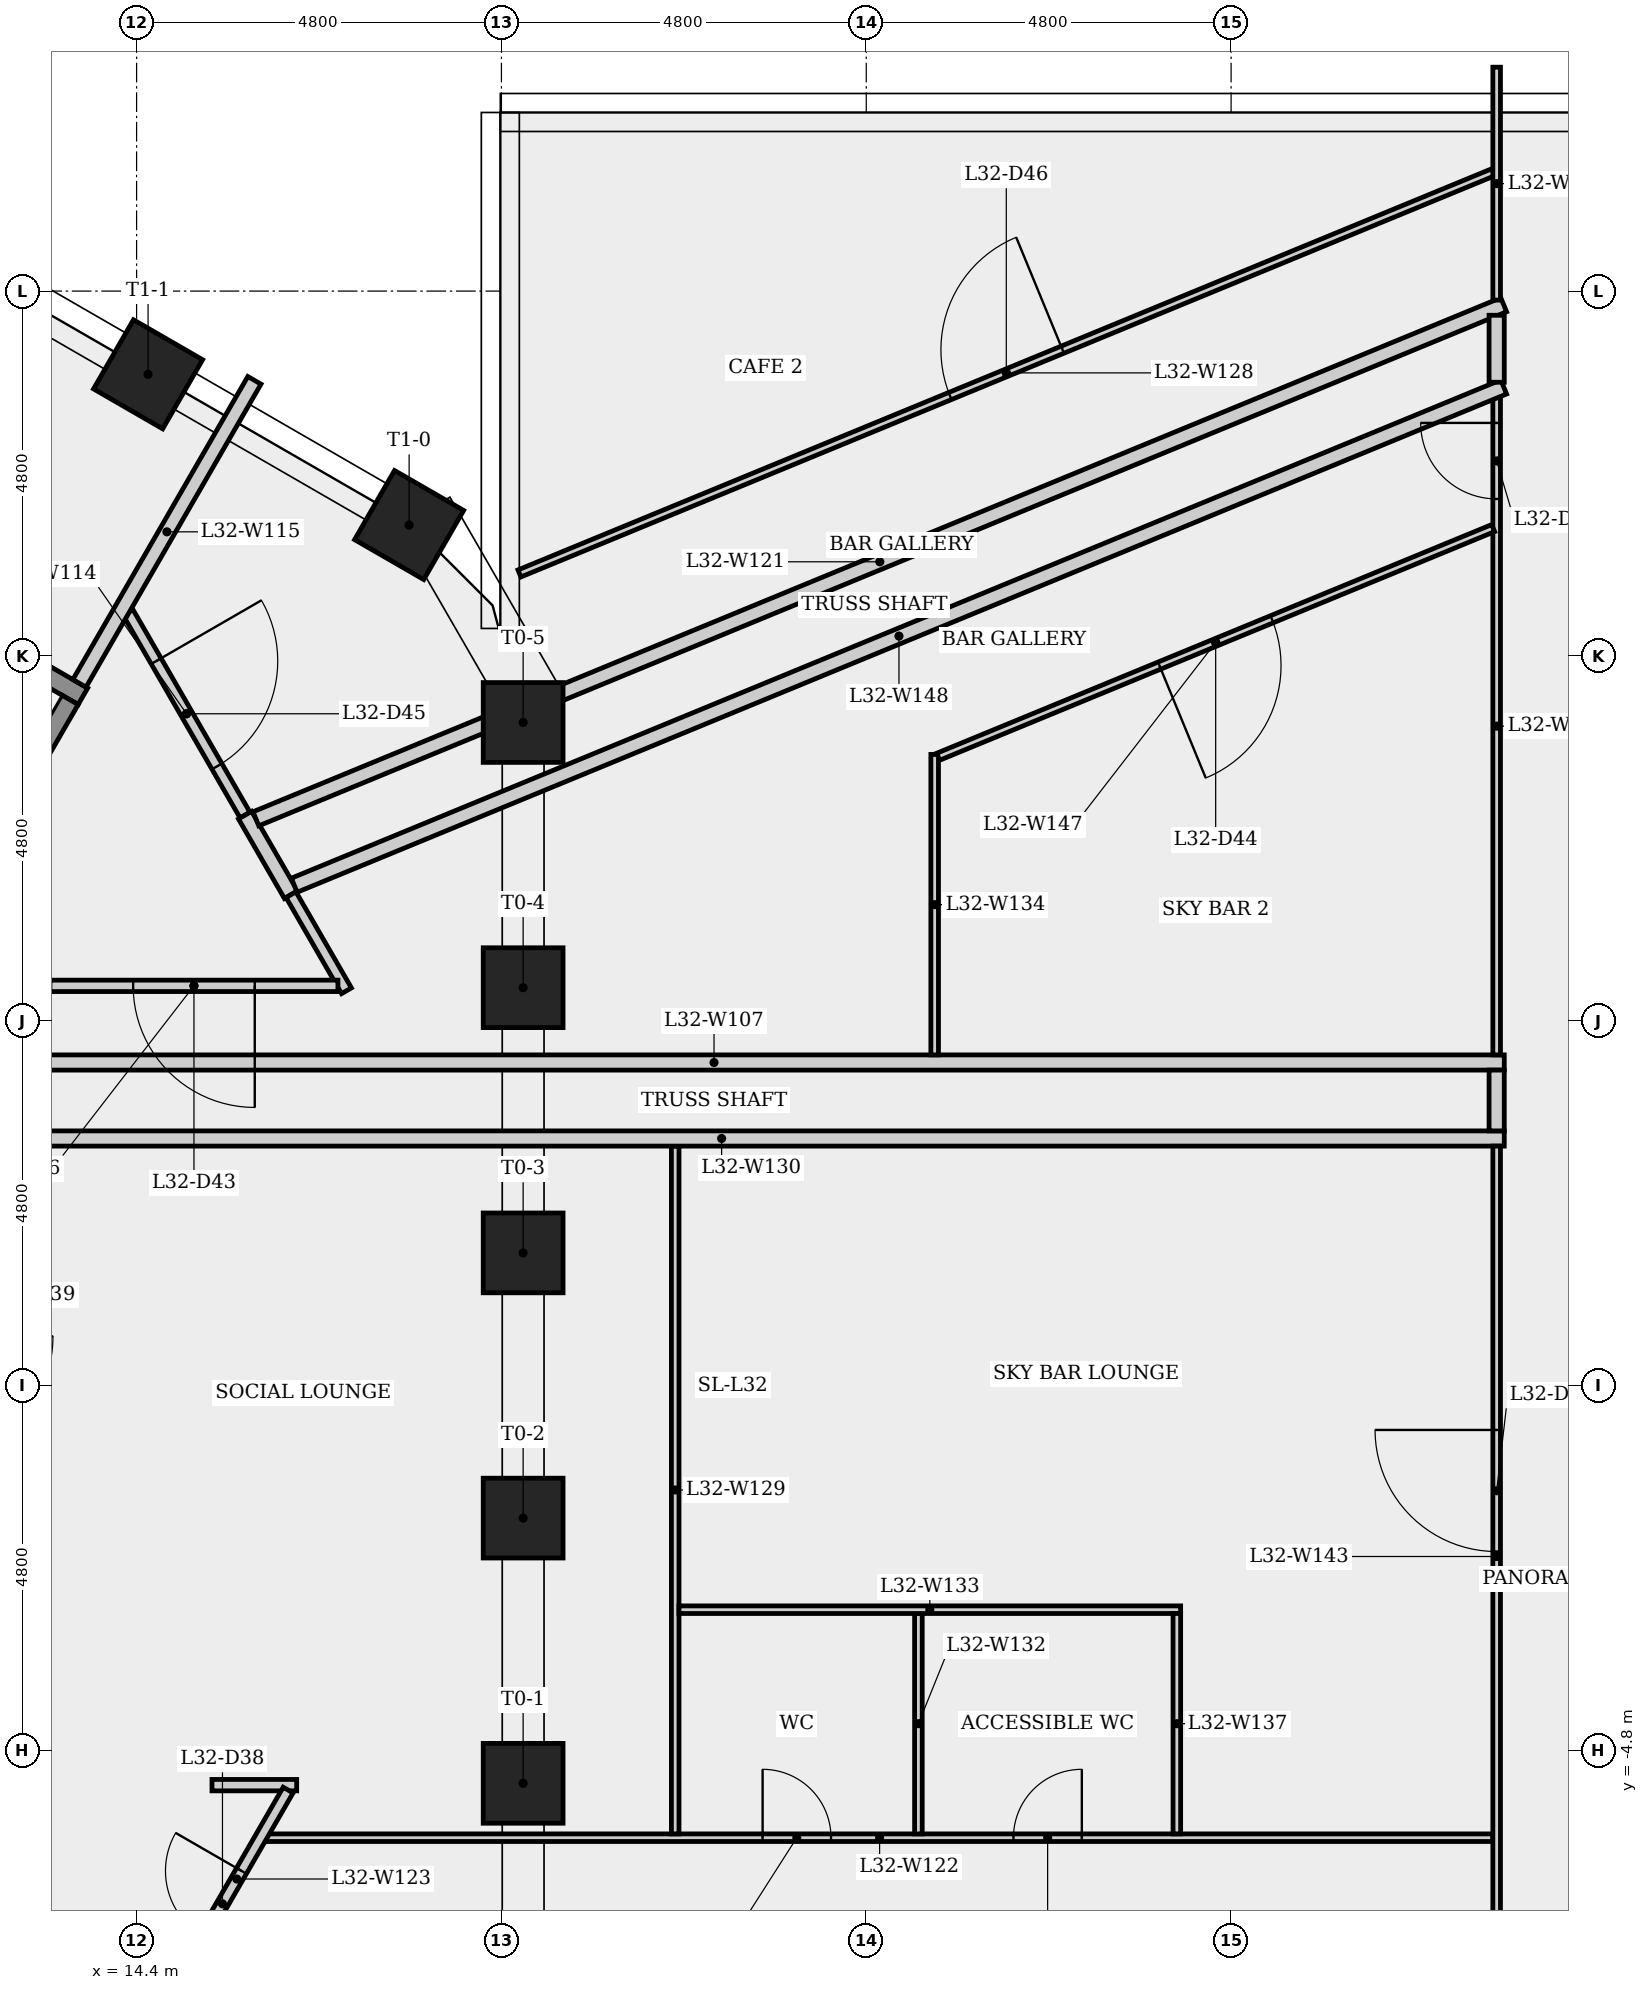
"""IFC4 building model, lengths in metres.
Left out: names, types, materials, properties, quantities, classifications, styles, units other than length and angle.
Written with IfcOpenShell. Run it as: python <this file> out.ifc"""

import sys

from ifc_helpers import new_model, si_unit, direction, frame, frame_2d, origin, origin_2d, place, context, subcontext, project, spatial, rectangle, extrude, element, fill, save


model = new_model("IFC4")
c1 = context("Model", 3, precision=1e-05, world=origin(), true_north=direction((0.0, 1.0)))
c2 = subcontext(c1, "Body", "Model", "MODEL_VIEW")
j1 = project(units=[si_unit("LENGTHUNIT", "METRE"), si_unit("PLANEANGLEUNIT", "RADIAN")], contexts=[c1])
p1 = place(None, origin())
s1 = spatial("IfcSite", under=j1, at=p1, CompositionType="ELEMENT")
p2 = place(p1, origin())
s2 = spatial("IfcBuilding", under=s1, at=p2, CompositionType="ELEMENT")
p3 = place(p2, frame((0.0, 0.0, 120.5)))
s3 = spatial("IfcBuildingStorey", under=s2, at=p3, CompositionType="ELEMENT", Elevation=120.5)
for number, where, z_axis, x_axis in (
    (1, (19.486, -5.234, 0.0), (0.0, 0.0, 1.0), (1.0, 0.0, 0.0)),
    (2, (19.486, -1.745, 0.0), (0.0, 0.0, 1.0), (1.0, 0.0, 0.0)),
    (3, (19.486, 1.745, 0.0), (0.0, 0.0, 1.0), (1.0, 0.0, 0.0)),
    (4, (19.486, 5.234, 0.0), (0.0, 0.0, 1.0), (1.0, 0.0, 0.0)),
    (5, (19.486, 8.724, 0.0), (0.0, 0.0, 1.0), (1.0, 0.0, 0.0)),
    (6, (17.986, 11.322, 0.0), (0.0, 0.0, 1.0), (0.5, 0.866, 0.0)),
    (7, (14.551, 13.305, 0.0), (0.0, 0.0, 1.0), (0.5, 0.866, 0.0)),
):
    element("IfcColumn", number, at=place(p3, frame(where, z_axis=z_axis, x_axis=x_axis)), inside=s3, PredefinedType="COLUMN", context=c2, shape_type="SweptSolid", body=[
        extrude(rectangle(XDim=1.05, YDim=1.05, at=origin_2d()), origin(), (0.0, 0.0, 1.0), 4.0),
    ])
p4 = place(p3, frame((8.151, 12.268, 0.0), z_axis=(0.0, 0.0, 1.0), x_axis=(0.866025499775, -0.499999833739, 0.0)))
e8 = element("IfcWall", 8, at=p4, inside=s3, PredefinedType="SHEAR", context=c2, shape_type="SweptSolid", body=[
    extrude(rectangle(XDim=6.4, YDim=0.25, at=frame_2d((3.2, 0.0))), origin(), (0.0, 0.0, 1.0), 3.6),
])
p5 = place(p3, frame((11.6, 4.25, 0.0), z_axis=(0.0, 0.0, 1.0), x_axis=(1.0, 0.0, 0.0)))
e9 = element("IfcWall", 9, at=p5, inside=s3, PredefinedType="PLUMBINGWALL", context=c2, shape_type="SweptSolid", body=[
    extrude(rectangle(XDim=20.794, YDim=0.2, at=frame_2d((10.397, 0.0))), origin(), (0.0, 0.0, 1.0), 3.6),
])
p6 = place(p3, frame((13.523, 9.022, 0.0), z_axis=(0.0, 0.0, 1.0), x_axis=(-0.500013277472, -0.866017737897, 0.0)))
e10 = element("IfcWall", 10, at=p6, inside=s3, PredefinedType="SHEAR", context=c2, shape_type="SweptSolid", body=[
    extrude(rectangle(XDim=2.786, YDim=0.25, at=frame_2d((1.393, 0.0))), origin(), (0.0, 0.0, 1.0), 3.6),
])
p7 = place(p3, frame((14.287, 10.172, 0.0), z_axis=(0.0, 0.0, 1.0), x_axis=(0.500017452277, -0.866015327473, 0.0)))
e11 = element("IfcWall", 11, at=p7, inside=s3, PredefinedType="PARTITIONING", context=c2, shape_type="SweptSolid", body=[
    extrude(rectangle(XDim=3.081, YDim=0.15, at=frame_2d((1.54, 0.0))), origin(), (0.0, 0.0, 1.0), 3.6),
])
p8 = place(p7, frame((0.74, 0.0, 0.0)))
e12 = element("IfcOpeningElement", 12, at=p8, cuts=e11, PredefinedType="OPENING", context=c2, shape_type="SweptSolid", body=[
    extrude(rectangle(XDim=1.6, YDim=2.1, at=frame_2d((0.8, 1.05))), frame((0.0, 0.085, 0.0), z_axis=(0.0, -1.0, 0.0), x_axis=(1.0, 0.0, 0.0)), (0.0, 0.0, 1.0), 0.17),
])
p9 = place(p3, frame((13.648, 9.239, 0.0), z_axis=(0.0, 0.0, 1.0), x_axis=(0.499971870506, 0.866041643746, 0.0)))
e13 = element("IfcWall", 13, at=p9, inside=s3, PredefinedType="PLUMBINGWALL", context=c2, shape_type="SweptSolid", body=[
    extrude(rectangle(XDim=4.604, YDim=0.2, at=frame_2d((2.302, 0.0))), origin(), (0.0, 0.0, 1.0), 3.6),
])
p10 = place(p3, frame((15.392, -5.259, 0.0), z_axis=(0.0, 0.0, 1.0), x_axis=(1.0, 0.0, 0.0)))
e14 = element("IfcWall", 14, at=p10, inside=s3, PredefinedType="PARTITIONING", context=c2, shape_type="SweptSolid", body=[
    extrude(rectangle(XDim=1.114, YDim=0.15, at=frame_2d((0.557, 0.0))), origin(), (0.0, 0.0, 1.0), 3.6),
])
p11 = place(p3, frame((15.827, 7.505, 0.0), z_axis=(0.0, 0.0, 1.0), x_axis=(0.500112762726, -0.865960290405, 0.0)))
e15 = element("IfcWall", 15, at=p11, inside=s3, PredefinedType="PLUMBINGWALL", context=c2, shape_type="SweptSolid", body=[
    extrude(rectangle(XDim=1.209, YDim=0.2, at=frame_2d((0.604, 0.0))), origin(), (0.0, 0.0, 1.0), 3.6),
])
p12 = place(p3, frame((15.969, 7.456, 0.0), z_axis=(0.0, 0.0, 1.0), x_axis=(0.924606037794, 0.380924762749, 0.0)))
e16 = element("IfcWall", 16, at=p12, inside=s3, PredefinedType="PLUMBINGWALL", context=c2, shape_type="SweptSolid", body=[
    extrude(rectangle(XDim=17.756, YDim=0.2, at=frame_2d((8.878, 0.0))), origin(), (0.0, 0.0, 1.0), 3.6),
])
p13 = place(p3, frame((16.107, -5.95, 0.0), z_axis=(0.0, 0.0, 1.0), x_axis=(1.0, 0.0, 0.0)))
e17 = element("IfcWall", 17, at=p13, inside=s3, PredefinedType="PARTITIONING", context=c2, shape_type="SweptSolid", body=[
    extrude(rectangle(XDim=16.137, YDim=0.1, at=frame_2d((8.069, 0.0))), origin(), (0.0, 0.0, 1.0), 3.6),
])
p14 = place(p13, frame((6.529, 0.0, 0.0)))
e18 = element("IfcOpeningElement", 18, at=p14, cuts=e17, PredefinedType="OPENING", context=c2, shape_type="SweptSolid", body=[
    extrude(rectangle(XDim=0.9, YDim=2.1, at=frame_2d((0.45, 1.05))), frame((0.0, 0.06, 0.0), z_axis=(0.0, -1.0, 0.0), x_axis=(1.0, 0.0, 0.0)), (0.0, 0.0, 1.0), 0.12),
])
p15 = place(p13, frame((9.829, 0.0, 0.0)))
e19 = element("IfcOpeningElement", 19, at=p15, cuts=e17, PredefinedType="OPENING", context=c2, shape_type="SweptSolid", body=[
    extrude(rectangle(XDim=0.9, YDim=2.1, at=frame_2d((0.45, 1.05))), frame((0.0, 0.06, 0.0), z_axis=(0.0, -1.0, 0.0), x_axis=(1.0, 0.0, 0.0)), (0.0, 0.0, 1.0), 0.12),
])
p16 = place(p3, frame((15.042, -7.664, 0.0), z_axis=(0.0, 0.0, 1.0), x_axis=(0.500006618465, 0.866021582578, 0.0)))
e20 = element("IfcWall", 20, at=p16, inside=s3, PredefinedType="PARTITIONING", context=c2, shape_type="SweptSolid", body=[
    extrude(rectangle(XDim=2.702, YDim=0.15, at=frame_2d((1.351, 0.0))), origin(), (0.0, 0.0, 1.0), 3.6),
])
p17 = place(p16, frame((0.474, 0.0, 0.0)))
e21 = element("IfcOpeningElement", 21, at=p17, cuts=e20, PredefinedType="OPENING", context=c2, shape_type="SweptSolid", body=[
    extrude(rectangle(XDim=1.0, YDim=2.1, at=frame_2d((0.5, 1.05))), frame((0.0, 0.085, 0.0), z_axis=(0.0, -1.0, 0.0), x_axis=(1.0, 0.0, 0.0)), (0.0, 0.0, 1.0), 0.17),
])
p18 = place(p3, frame((16.431, 6.458, 0.0), z_axis=(0.0, 0.0, 1.0), x_axis=(0.49998782916, -0.866032430508, 0.0)))
e22 = element("IfcWall", 22, at=p18, inside=s3, PredefinedType="PARTITIONING", context=c2, shape_type="SweptSolid", body=[
    extrude(rectangle(XDim=1.46, YDim=0.15, at=frame_2d((0.73, 0.0))), origin(), (0.0, 0.0, 1.0), 3.6),
])
p19 = place(p3, frame((17.049, 5.259, 0.0), z_axis=(0.0, 0.0, 1.0), x_axis=(-1.0, 0.0, 0.0)))
e23 = element("IfcWall", 23, at=p19, inside=s3, PredefinedType="PARTITIONING", context=c2, shape_type="SweptSolid", body=[
    extrude(rectangle(XDim=3.789, YDim=0.15, at=frame_2d((1.895, 0.0))), origin(), (0.0, 0.0, 1.0), 3.6),
])
p20 = place(p19, frame((1.094, 0.0, 0.0)))
e24 = element("IfcOpeningElement", 24, at=p20, cuts=e23, PredefinedType="OPENING", context=c2, shape_type="SweptSolid", body=[
    extrude(rectangle(XDim=1.6, YDim=2.1, at=frame_2d((0.8, 1.05))), frame((0.0, 0.085, 0.0), z_axis=(0.0, -1.0, 0.0), x_axis=(1.0, 0.0, 0.0)), (0.0, 0.0, 1.0), 0.17),
])
p21 = place(p3, frame((19.437, 10.685, 0.0), z_axis=(0.0, 0.0, 1.0), x_axis=(0.924603272901, 0.380931473813, 0.0)))
e25 = element("IfcWall", 25, at=p21, inside=s3, PredefinedType="PARTITIONING", context=c2, shape_type="SweptSolid", body=[
    extrude(rectangle(XDim=13.856, YDim=0.1, at=frame_2d((6.928, 0.0))), origin(), (0.0, 0.0, 1.0), 3.6),
])
p22 = place(p21, frame((6.128, 0.0, 0.0)))
e26 = element("IfcOpeningElement", 26, at=p22, cuts=e25, PredefinedType="OPENING", context=c2, shape_type="SweptSolid", body=[
    extrude(rectangle(XDim=1.6, YDim=2.1, at=frame_2d((0.8, 1.05))), frame((0.0, 0.06, 0.0), z_axis=(0.0, -1.0, 0.0), x_axis=(1.0, 0.0, 0.0)), (0.0, 0.0, 1.0), 0.12),
])
p23 = place(p3, frame((21.486, -5.9, 0.0), z_axis=(0.0, 0.0, 1.0), x_axis=(0.0, 1.0, 0.0)))
e27 = element("IfcWall", 27, at=p23, inside=s3, PredefinedType="PARTITIONING", context=c2, shape_type="SweptSolid", body=[
    extrude(rectangle(XDim=9.05, YDim=0.1, at=frame_2d((4.525, 0.0))), origin(), (0.0, 0.0, 1.0), 3.6),
])
p24 = place(p3, frame((11.8, 3.25, 0.0), z_axis=(0.0, 0.0, 1.0), x_axis=(1.0, 0.0, 0.0)))
e28 = element("IfcWall", 28, at=p24, inside=s3, PredefinedType="PLUMBINGWALL", context=c2, shape_type="SweptSolid", body=[
    extrude(rectangle(XDim=20.594, YDim=0.2, at=frame_2d((10.297, 0.0))), origin(), (0.0, 0.0, 1.0), 3.6),
])
p25 = place(p3, frame((24.686, -3.0, 0.0), z_axis=(0.0, 0.0, 1.0), x_axis=(0.0, -1.0, 0.0)))
e29 = element("IfcWall", 29, at=p25, inside=s3, PredefinedType="PARTITIONING", context=c2, shape_type="SweptSolid", body=[
    extrude(rectangle(XDim=2.9, YDim=0.1, at=frame_2d((1.45, 0.0))), origin(), (0.0, 0.0, 1.0), 3.6),
])
p26 = place(p3, frame((21.536, -2.95, 0.0), z_axis=(0.0, 0.0, 1.0), x_axis=(1.0, 0.0, 0.0)))
e30 = element("IfcWall", 30, at=p26, inside=s3, PredefinedType="PARTITIONING", context=c2, shape_type="SweptSolid", body=[
    extrude(rectangle(XDim=6.6, YDim=0.1, at=frame_2d((3.3, 0.0))), origin(), (0.0, 0.0, 1.0), 3.6),
])
p27 = place(p3, frame((24.9, 8.304, 0.0), z_axis=(0.0, 0.0, 1.0), x_axis=(0.0, -1.0, 0.0)))
e31 = element("IfcWall", 31, at=p27, inside=s3, PredefinedType="PARTITIONING", context=c2, shape_type="SweptSolid", body=[
    extrude(rectangle(XDim=3.954, YDim=0.1, at=frame_2d((1.977, 0.0))), origin(), (0.0, 0.0, 1.0), 3.6),
])
p28 = place(p3, frame((28.086, -5.9, 0.0), z_axis=(0.0, 0.0, 1.0), x_axis=(0.0, 1.0, 0.0)))
e32 = element("IfcWall", 32, at=p28, inside=s3, PredefinedType="PARTITIONING", context=c2, shape_type="SweptSolid", body=[
    extrude(rectangle(XDim=2.9, YDim=0.1, at=frame_2d((1.45, 0.0))), origin(), (0.0, 0.0, 1.0), 3.6),
])
p29 = place(p3, frame((32.294, -7.65, 0.0), z_axis=(0.0, 0.0, 1.0), x_axis=(0.0, 1.0, 0.0)))
e33 = element("IfcWall", 33, at=p29, inside=s3, PredefinedType="PARTITIONING", context=c2, shape_type="SweptSolid", body=[
    extrude(rectangle(XDim=10.8, YDim=0.1, at=frame_2d((5.4, 0.0))), origin(), (0.0, 0.0, 1.0), 3.6),
])
p30 = place(p29, frame((5.465, 0.0, 0.0)))
e34 = element("IfcOpeningElement", 34, at=p30, cuts=e33, PredefinedType="OPENING", context=c2, shape_type="SweptSolid", body=[
    extrude(rectangle(XDim=1.6, YDim=2.1, at=frame_2d((0.8, 1.05))), frame((0.0, 0.06, 0.0), z_axis=(0.0, -1.0, 0.0), x_axis=(1.0, 0.0, 0.0)), (0.0, 0.0, 1.0), 0.12),
])
p31 = place(p3, frame((32.294, 4.35, 0.0), z_axis=(0.0, 0.0, 1.0), x_axis=(0.0, 1.0, 0.0)))
e35 = element("IfcWall", 35, at=p31, inside=s3, PredefinedType="PARTITIONING", context=c2, shape_type="SweptSolid", body=[
    extrude(rectangle(XDim=8.651, YDim=0.1, at=frame_2d((4.325, 0.0))), origin(), (0.0, 0.0, 1.0), 3.6),
])
p32 = place(p31, frame((7.315, 0.0, 0.0)))
e36 = element("IfcOpeningElement", 36, at=p32, cuts=e35, PredefinedType="OPENING", context=c2, shape_type="SweptSolid", body=[
    extrude(rectangle(XDim=1.0, YDim=2.1, at=frame_2d((0.5, 1.05))), frame((0.0, 0.06, 0.0), z_axis=(0.0, -1.0, 0.0), x_axis=(1.0, 0.0, 0.0)), (0.0, 0.0, 1.0), 0.12),
])
p33 = place(p3, frame((32.294, 4.15, 0.0), z_axis=(0.0, 0.0, 1.0), x_axis=(0.0, -1.0, 0.0)))
e37 = element("IfcWall", 37, at=p33, inside=s3, PredefinedType="PLUMBINGWALL", context=c2, shape_type="SweptSolid", body=[
    extrude(rectangle(XDim=0.8, YDim=0.2, at=frame_2d((0.4, 0.0))), origin(), (0.0, 0.0, 1.0), 3.6),
])
p34 = place(p3, frame((32.248, 11.281, 0.0), z_axis=(0.0, 0.0, 1.0), x_axis=(-0.924598044609, -0.380944163763, 0.0)))
e38 = element("IfcWall", 38, at=p34, inside=s3, PredefinedType="PARTITIONING", context=c2, shape_type="SweptSolid", body=[
    extrude(rectangle(XDim=7.897, YDim=0.1, at=frame_2d((3.948, 0.0))), origin(), (0.0, 0.0, 1.0), 3.6),
])
p35 = place(p34, frame((3.148, 0.0, 0.0)))
e39 = element("IfcOpeningElement", 39, at=p35, cuts=e38, PredefinedType="OPENING", context=c2, shape_type="SweptSolid", body=[
    extrude(rectangle(XDim=1.6, YDim=2.1, at=frame_2d((0.8, 1.05))), frame((0.0, 0.06, 0.0), z_axis=(0.0, -1.0, 0.0), x_axis=(1.0, 0.0, 0.0)), (0.0, 0.0, 1.0), 0.12),
])
p36 = place(p3, frame((32.387, 13.138, 0.0), z_axis=(0.0, 0.0, 1.0), x_axis=(-0.924603164354, -0.380931737279, 0.0)))
e40 = element("IfcWall", 40, at=p36, inside=s3, PredefinedType="PLUMBINGWALL", context=c2, shape_type="SweptSolid", body=[
    extrude(rectangle(XDim=17.21, YDim=0.2, at=frame_2d((8.605, 0.0))), origin(), (0.0, 0.0, 1.0), 3.6),
])
p37 = place(p3, frame((32.294, 14.282, 0.0), z_axis=(0.0, 0.0, 1.0), x_axis=(0.0, 1.0, 0.0)))
e41 = element("IfcWall", 41, at=p37, inside=s3, PredefinedType="PARTITIONING", context=c2, shape_type="SweptSolid", body=[
    extrude(rectangle(XDim=3.064, YDim=0.1, at=frame_2d((1.532, 0.0))), origin(), (0.0, 0.0, 1.0), 3.6),
])
p38 = place(p3, frame((32.294, 14.082, 0.0), z_axis=(0.0, 0.0, 1.0), x_axis=(0.0, -1.0, 0.0)))
e42 = element("IfcWall", 42, at=p38, inside=s3, PredefinedType="PLUMBINGWALL", context=c2, shape_type="SweptSolid", body=[
    extrude(rectangle(XDim=0.881, YDim=0.2, at=frame_2d((0.441, 0.0))), origin(), (0.0, 0.0, 1.0), 3.6),
])
p39 = place(p32, origin())
e43 = element("IfcDoor", 43, at=p39, inside=s3, OperationType="SINGLE_SWING_RIGHT", PredefinedType="DOOR", context=c2, shape_type="SweptSolid", body=[
    extrude(rectangle(XDim=1.0, YDim=2.1, at=frame_2d((0.5, 1.05))), frame((0.0, 0.025, 0.0), z_axis=(0.0, -1.0, 0.0), x_axis=(1.0, 0.0, 0.0)), (0.0, 0.0, 1.0), 0.05),
])
fill(e36, e43)
p40 = place(p17, origin())
e44 = element("IfcDoor", 44, at=p40, inside=s3, OperationType="SINGLE_SWING_RIGHT", PredefinedType="DOOR", context=c2, shape_type="SweptSolid", body=[
    extrude(rectangle(XDim=1.0, YDim=2.1, at=frame_2d((0.5, 1.05))), frame((0.0, 0.025, 0.0), z_axis=(0.0, -1.0, 0.0), x_axis=(1.0, 0.0, 0.0)), (0.0, 0.0, 1.0), 0.05),
])
fill(e21, e44)
p41 = place(p30, origin())
e45 = element("IfcDoor", 45, at=p41, inside=s3, OperationType="SINGLE_SWING_RIGHT", PredefinedType="DOOR", context=c2, shape_type="SweptSolid", body=[
    extrude(rectangle(XDim=1.6, YDim=2.1, at=frame_2d((0.8, 1.05))), frame((0.0, 0.025, 0.0), z_axis=(0.0, -1.0, 0.0), x_axis=(1.0, 0.0, 0.0)), (0.0, 0.0, 1.0), 0.05),
])
fill(e34, e45)
p42 = place(p14, origin())
e46 = element("IfcDoor", 46, at=p42, inside=s3, OperationType="SINGLE_SWING_LEFT", PredefinedType="DOOR", context=c2, shape_type="SweptSolid", body=[
    extrude(rectangle(XDim=0.9, YDim=2.1, at=frame_2d((0.45, 1.05))), frame((0.0, 0.025, 0.0), z_axis=(0.0, -1.0, 0.0), x_axis=(1.0, 0.0, 0.0)), (0.0, 0.0, 1.0), 0.05),
])
fill(e18, e46)
p43 = place(p15, origin())
e47 = element("IfcDoor", 47, at=p43, inside=s3, OperationType="SINGLE_SWING_RIGHT", PredefinedType="DOOR", context=c2, shape_type="SweptSolid", body=[
    extrude(rectangle(XDim=0.9, YDim=2.1, at=frame_2d((0.45, 1.05))), frame((0.0, 0.025, 0.0), z_axis=(0.0, -1.0, 0.0), x_axis=(1.0, 0.0, 0.0)), (0.0, 0.0, 1.0), 0.05),
])
fill(e19, e47)
p44 = place(p20, origin())
e48 = element("IfcDoor", 48, at=p44, inside=s3, OperationType="SINGLE_SWING_LEFT", PredefinedType="DOOR", context=c2, shape_type="SweptSolid", body=[
    extrude(rectangle(XDim=1.6, YDim=2.1, at=frame_2d((0.8, 1.05))), frame((0.0, 0.025, 0.0), z_axis=(0.0, -1.0, 0.0), x_axis=(1.0, 0.0, 0.0)), (0.0, 0.0, 1.0), 0.05),
])
fill(e24, e48)
p45 = place(p35, origin())
e49 = element("IfcDoor", 49, at=p45, inside=s3, OperationType="SINGLE_SWING_RIGHT", PredefinedType="DOOR", context=c2, shape_type="SweptSolid", body=[
    extrude(rectangle(XDim=1.6, YDim=2.1, at=frame_2d((0.8, 1.05))), frame((0.0, 0.025, 0.0), z_axis=(0.0, -1.0, 0.0), x_axis=(1.0, 0.0, 0.0)), (0.0, 0.0, 1.0), 0.05),
])
fill(e39, e49)
p46 = place(p8, origin())
e50 = element("IfcDoor", 50, at=p46, inside=s3, OperationType="SINGLE_SWING_LEFT", PredefinedType="DOOR", context=c2, shape_type="SweptSolid", body=[
    extrude(rectangle(XDim=1.6, YDim=2.1, at=frame_2d((0.8, 1.05))), frame((0.0, 0.025, 0.0), z_axis=(0.0, -1.0, 0.0), x_axis=(1.0, 0.0, 0.0)), (0.0, 0.0, 1.0), 0.05),
])
fill(e12, e50)
p47 = place(p22, origin())
e51 = element("IfcDoor", 51, at=p47, inside=s3, OperationType="SINGLE_SWING_RIGHT", PredefinedType="DOOR", context=c2, shape_type="SweptSolid", body=[
    extrude(rectangle(XDim=1.6, YDim=2.1, at=frame_2d((0.8, 1.05))), frame((0.0, 0.025, 0.0), z_axis=(0.0, -1.0, 0.0), x_axis=(1.0, 0.0, 0.0)), (0.0, 0.0, 1.0), 0.05),
])
fill(e26, e51)
save(model, sys.argv[1])
